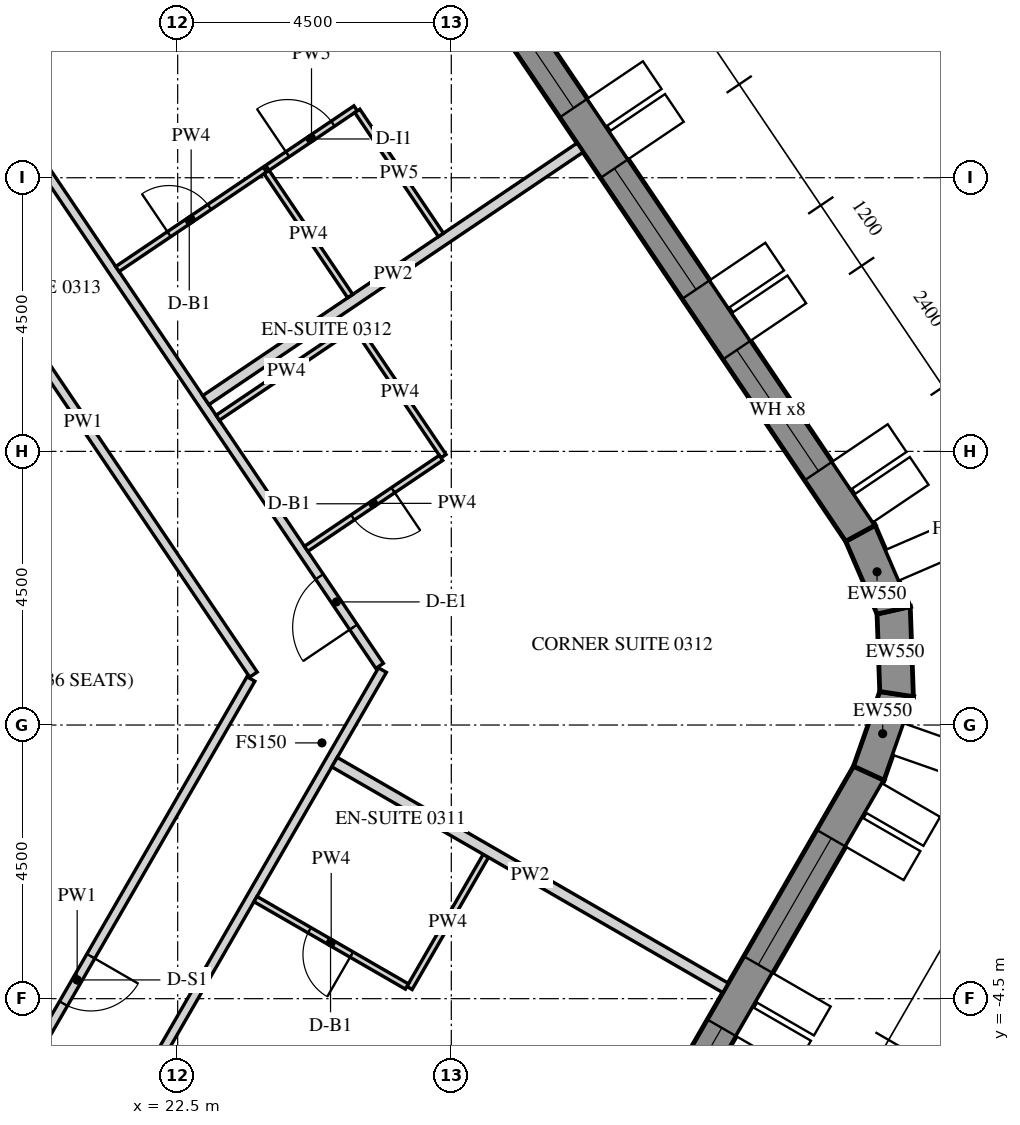
"""IFC4 building model, lengths in metres.
Left out: names, types, materials, properties, quantities, classifications, styles, units other than length and angle.
Written with IfcOpenShell. Run it as: python <this file> out.ifc"""

import sys

from ifc_helpers import new_model, si_unit, direction, frame, frame_2d, origin, place, context, subcontext, project, spatial, polyline, rectangle, outline, extrude, element, fill, save


model = new_model("IFC4")
c1 = context("Model", 3, precision=1e-05, world=origin(), true_north=direction((0.0, 1.0)))
c2 = subcontext(c1, "Body", "Model", "MODEL_VIEW")
j1 = project(units=[si_unit("LENGTHUNIT", "METRE"), si_unit("PLANEANGLEUNIT", "RADIAN")], contexts=[c1])
p1 = place(None, origin())
s1 = spatial("IfcSite", under=j1, at=p1, CompositionType="ELEMENT")
p2 = place(p1, origin())
s2 = spatial("IfcBuilding", under=s1, at=p2, CompositionType="ELEMENT")
p3 = place(p2, frame((0.0, 0.0, 60.9)))
s3 = spatial("IfcBuildingStorey", under=s2, at=p3, CompositionType="ELEMENT", Elevation=60.9)
p4 = place(p3, frame((18.83, -26.835, -0.15), z_axis=(0.0, 0.0, 1.0), x_axis=(0.500003800416, 0.866023209602, 0.0)))
e1 = element("IfcWall", 1, at=p4, inside=s3, PredefinedType="SOLIDWALL", context=c2, shape_type="SweptSolid", body=[
    extrude(outline(polyline([(-0.022, -0.275), (30.097, -0.275), (30.045, 0.275), (0.022, 0.275), (-0.022, -0.275)])), origin(), (0.0, 0.0, 1.0), 3.9),
])
p5 = place(p4, frame((1.236, 0.0, 1.05)))
e2 = element("IfcOpeningElement", 2, at=p5, cuts=e1, PredefinedType="OPENING", context=c2, shape_type="SweptSolid", body=[
    extrude(rectangle(XDim=2.4, YDim=2.4, at=frame_2d((1.2, 1.2))), frame((0.0, 0.285, 0.0), z_axis=(0.0, -1.0, 0.0), x_axis=(1.0, 0.0, 0.0)), (0.0, 0.0, 1.0), 0.57),
])
p6 = place(p4, frame((4.835, 0.0, 1.05)))
e3 = element("IfcOpeningElement", 3, at=p6, cuts=e1, PredefinedType="OPENING", context=c2, shape_type="SweptSolid", body=[
    extrude(rectangle(XDim=2.4, YDim=2.4, at=frame_2d((1.2, 1.2))), frame((0.0, 0.285, 0.0), z_axis=(0.0, -1.0, 0.0), x_axis=(1.0, 0.0, 0.0)), (0.0, 0.0, 1.0), 0.57),
])
p7 = place(p4, frame((8.436, 0.0, 1.05)))
e4 = element("IfcOpeningElement", 4, at=p7, cuts=e1, PredefinedType="OPENING", context=c2, shape_type="SweptSolid", body=[
    extrude(rectangle(XDim=2.4, YDim=2.4, at=frame_2d((1.2, 1.2))), frame((0.0, 0.285, 0.0), z_axis=(0.0, -1.0, 0.0), x_axis=(1.0, 0.0, 0.0)), (0.0, 0.0, 1.0), 0.57),
])
p8 = place(p4, frame((12.035, 0.0, 1.05)))
e5 = element("IfcOpeningElement", 5, at=p8, cuts=e1, PredefinedType="OPENING", context=c2, shape_type="SweptSolid", body=[
    extrude(rectangle(XDim=2.4, YDim=2.4, at=frame_2d((1.2, 1.2))), frame((0.0, 0.285, 0.0), z_axis=(0.0, -1.0, 0.0), x_axis=(1.0, 0.0, 0.0)), (0.0, 0.0, 1.0), 0.57),
])
p9 = place(p4, frame((15.635, 0.0, 1.05)))
e6 = element("IfcOpeningElement", 6, at=p9, cuts=e1, PredefinedType="OPENING", context=c2, shape_type="SweptSolid", body=[
    extrude(rectangle(XDim=2.4, YDim=2.4, at=frame_2d((1.2, 1.2))), frame((0.0, 0.285, 0.0), z_axis=(0.0, -1.0, 0.0), x_axis=(1.0, 0.0, 0.0)), (0.0, 0.0, 1.0), 0.57),
])
p10 = place(p4, frame((19.236, 0.0, 1.05)))
e7 = element("IfcOpeningElement", 7, at=p10, cuts=e1, PredefinedType="OPENING", context=c2, shape_type="SweptSolid", body=[
    extrude(rectangle(XDim=2.4, YDim=2.4, at=frame_2d((1.2, 1.2))), frame((0.0, 0.285, 0.0), z_axis=(0.0, -1.0, 0.0), x_axis=(1.0, 0.0, 0.0)), (0.0, 0.0, 1.0), 0.57),
])
p11 = place(p4, frame((22.835, 0.0, 1.05)))
e8 = element("IfcOpeningElement", 8, at=p11, cuts=e1, PredefinedType="OPENING", context=c2, shape_type="SweptSolid", body=[
    extrude(rectangle(XDim=2.4, YDim=2.4, at=frame_2d((1.2, 1.2))), frame((0.0, 0.285, 0.0), z_axis=(0.0, -1.0, 0.0), x_axis=(1.0, 0.0, 0.0)), (0.0, 0.0, 1.0), 0.57),
])
p12 = place(p4, frame((26.436, 0.0, 1.05)))
e9 = element("IfcOpeningElement", 9, at=p12, cuts=e1, PredefinedType="OPENING", context=c2, shape_type="SweptSolid", body=[
    extrude(rectangle(XDim=2.4, YDim=2.4, at=frame_2d((1.2, 1.2))), frame((0.0, 0.285, 0.0), z_axis=(0.0, -1.0, 0.0), x_axis=(1.0, 0.0, 0.0)), (0.0, 0.0, 1.0), 0.57),
])
p13 = place(p3, frame((33.866, -0.792, -0.15), z_axis=(0.0, 0.0, 1.0), x_axis=(0.33111537203, 0.943590276765, 0.0)))
e10 = element("IfcWall", 10, at=p13, inside=s3, PredefinedType="SOLIDWALL", context=c2, shape_type="SweptSolid", body=[
    extrude(outline(polyline([(-0.026, -0.275), (1.431, -0.275), (1.327, 0.275), (0.026, 0.275), (-0.026, -0.275)])), origin(), (0.0, 0.0, 1.0), 3.9),
])
p14 = place(p3, frame((34.323, 0.509, -0.15), z_axis=(0.0, 0.0, 1.0), x_axis=(-0.034876908462, 0.999391615562, 0.0)))
e11 = element("IfcWall", 11, at=p14, inside=s3, PredefinedType="SOLIDWALL", context=c2, shape_type="SweptSolid", body=[
    extrude(outline(polyline([(-0.052, -0.275), (1.431, -0.275), (1.327, 0.275), (0.052, 0.275), (-0.052, -0.275)])), origin(), (0.0, 0.0, 1.0), 3.9),
])
p15 = place(p3, frame((34.274, 1.887, -0.15), z_axis=(0.0, 0.0, 1.0), x_axis=(-0.396161342798, 0.918180913803, 0.0)))
e12 = element("IfcWall", 12, at=p15, inside=s3, PredefinedType="SOLIDWALL", context=c2, shape_type="SweptSolid", body=[
    extrude(outline(polyline([(-0.052, -0.275), (1.405, -0.275), (1.354, 0.275), (0.052, 0.275), (-0.052, -0.275)])), origin(), (0.0, 0.0, 1.0), 3.9),
])
p16 = place(p3, frame((33.728, 3.153, -0.15), z_axis=(0.0, 0.0, 1.0), x_axis=(-0.559192411416, 0.82903790445, 0.0)))
e13 = element("IfcWall", 13, at=p16, inside=s3, PredefinedType="SOLIDWALL", context=c2, shape_type="SweptSolid", body=[
    extrude(outline(polyline([(-0.026, -0.275), (30.093, -0.275), (30.048, 0.275), (0.026, 0.275), (-0.026, -0.275)])), origin(), (0.0, 0.0, 1.0), 3.9),
])
p17 = place(p16, frame((1.236, 0.0, 1.05)))
e14 = element("IfcOpeningElement", 14, at=p17, cuts=e13, PredefinedType="OPENING", context=c2, shape_type="SweptSolid", body=[
    extrude(rectangle(XDim=2.4, YDim=2.4, at=frame_2d((1.2, 1.2))), frame((0.0, 0.285, 0.0), z_axis=(0.0, -1.0, 0.0), x_axis=(1.0, 0.0, 0.0)), (0.0, 0.0, 1.0), 0.57),
])
p18 = place(p16, frame((4.835, 0.0, 1.05)))
e15 = element("IfcOpeningElement", 15, at=p18, cuts=e13, PredefinedType="OPENING", context=c2, shape_type="SweptSolid", body=[
    extrude(rectangle(XDim=2.4, YDim=2.4, at=frame_2d((1.2, 1.2))), frame((0.0, 0.285, 0.0), z_axis=(0.0, -1.0, 0.0), x_axis=(1.0, 0.0, 0.0)), (0.0, 0.0, 1.0), 0.57),
])
p19 = place(p16, frame((8.436, 0.0, 1.05)))
e16 = element("IfcOpeningElement", 16, at=p19, cuts=e13, PredefinedType="OPENING", context=c2, shape_type="SweptSolid", body=[
    extrude(rectangle(XDim=2.4, YDim=2.4, at=frame_2d((1.2, 1.2))), frame((0.0, 0.285, 0.0), z_axis=(0.0, -1.0, 0.0), x_axis=(1.0, 0.0, 0.0)), (0.0, 0.0, 1.0), 0.57),
])
p20 = place(p16, frame((12.035, 0.0, 1.05)))
e17 = element("IfcOpeningElement", 17, at=p20, cuts=e13, PredefinedType="OPENING", context=c2, shape_type="SweptSolid", body=[
    extrude(rectangle(XDim=2.4, YDim=2.4, at=frame_2d((1.2, 1.2))), frame((0.0, 0.285, 0.0), z_axis=(0.0, -1.0, 0.0), x_axis=(1.0, 0.0, 0.0)), (0.0, 0.0, 1.0), 0.57),
])
p21 = place(p16, frame((15.635, 0.0, 1.05)))
e18 = element("IfcOpeningElement", 18, at=p21, cuts=e13, PredefinedType="OPENING", context=c2, shape_type="SweptSolid", body=[
    extrude(rectangle(XDim=2.4, YDim=2.4, at=frame_2d((1.2, 1.2))), frame((0.0, 0.285, 0.0), z_axis=(0.0, -1.0, 0.0), x_axis=(1.0, 0.0, 0.0)), (0.0, 0.0, 1.0), 0.57),
])
p22 = place(p16, frame((19.236, 0.0, 1.05)))
e19 = element("IfcOpeningElement", 19, at=p22, cuts=e13, PredefinedType="OPENING", context=c2, shape_type="SweptSolid", body=[
    extrude(rectangle(XDim=2.4, YDim=2.4, at=frame_2d((1.2, 1.2))), frame((0.0, 0.285, 0.0), z_axis=(0.0, -1.0, 0.0), x_axis=(1.0, 0.0, 0.0)), (0.0, 0.0, 1.0), 0.57),
])
p23 = place(p16, frame((22.835, 0.0, 1.05)))
e20 = element("IfcOpeningElement", 20, at=p23, cuts=e13, PredefinedType="OPENING", context=c2, shape_type="SweptSolid", body=[
    extrude(rectangle(XDim=2.4, YDim=2.4, at=frame_2d((1.2, 1.2))), frame((0.0, 0.285, 0.0), z_axis=(0.0, -1.0, 0.0), x_axis=(1.0, 0.0, 0.0)), (0.0, 0.0, 1.0), 0.57),
])
p24 = place(p16, frame((26.436, 0.0, 1.05)))
e21 = element("IfcOpeningElement", 21, at=p24, cuts=e13, PredefinedType="OPENING", context=c2, shape_type="SweptSolid", body=[
    extrude(rectangle(XDim=2.4, YDim=2.4, at=frame_2d((1.2, 1.2))), frame((0.0, 0.285, 0.0), z_axis=(0.0, -1.0, 0.0), x_axis=(1.0, 0.0, 0.0)), (0.0, 0.0, 1.0), 0.57),
])
p25 = place(p3, frame((13.928, -19.775, 0.0), z_axis=(0.0, 0.0, 1.0), x_axis=(0.50000450071, 0.866022805283, 0.0)))
e22 = element("IfcWall", 22, at=p25, inside=s3, PredefinedType="PARTITIONING", context=c2, shape_type="SweptSolid", body=[
    extrude(rectangle(XDim=23.877, YDim=0.15, at=frame_2d((11.938, 0.0))), origin(), (0.0, 0.0, 1.0), 2.988),
])
p26 = place(p25, frame((6.443, 0.0, 0.0)))
e23 = element("IfcOpeningElement", 23, at=p26, cuts=e22, PredefinedType="OPENING", context=c2, shape_type="SweptSolid", body=[
    extrude(rectangle(XDim=1.0, YDim=2.1, at=frame_2d((0.5, 1.05))), frame((0.0, 0.085, 0.0), z_axis=(0.0, -1.0, 0.0), x_axis=(1.0, 0.0, 0.0)), (0.0, 0.0, 1.0), 0.17),
])
p27 = place(p25, frame((14.972, 0.0, 0.0)))
e24 = element("IfcOpeningElement", 24, at=p27, cuts=e22, PredefinedType="OPENING", context=c2, shape_type="SweptSolid", body=[
    extrude(rectangle(XDim=1.0, YDim=2.1, at=frame_2d((0.5, 1.05))), frame((0.0, 0.085, 0.0), z_axis=(0.0, -1.0, 0.0), x_axis=(1.0, 0.0, 0.0)), (0.0, 0.0, 1.0), 0.17),
])
p28 = place(p3, frame((25.821, 0.972, 0.0), z_axis=(0.0, 0.0, 1.0), x_axis=(-0.559201442833, 0.829031812619, 0.0)))
e25 = element("IfcWall", 25, at=p28, inside=s3, PredefinedType="PARTITIONING", context=c2, shape_type="SweptSolid", body=[
    extrude(rectangle(XDim=22.002, YDim=0.15, at=frame_2d((11.001, 0.0))), origin(), (0.0, 0.0, 1.0), 2.988),
])
p29 = place(p28, frame((0.769, 0.0, 0.0)))
e26 = element("IfcOpeningElement", 26, at=p29, cuts=e25, PredefinedType="OPENING", context=c2, shape_type="SweptSolid", body=[
    extrude(rectangle(XDim=1.0, YDim=2.1, at=frame_2d((0.5, 1.05))), frame((0.0, 0.085, 0.0), z_axis=(0.0, -1.0, 0.0), x_axis=(1.0, 0.0, 0.0)), (0.0, 0.0, 1.0), 0.17),
])
p30 = place(p28, frame((11.421, 0.0, 0.0)))
e27 = element("IfcOpeningElement", 27, at=p30, cuts=e25, PredefinedType="OPENING", context=c2, shape_type="SweptSolid", body=[
    extrude(rectangle(XDim=1.0, YDim=2.1, at=frame_2d((0.5, 1.05))), frame((0.0, 0.085, 0.0), z_axis=(0.0, -1.0, 0.0), x_axis=(1.0, 0.0, 0.0)), (0.0, 0.0, 1.0), 0.17),
])
p31 = place(p28, frame((19.711, 0.0, 0.0)))
e28 = element("IfcOpeningElement", 28, at=p31, cuts=e25, PredefinedType="OPENING", context=c2, shape_type="SweptSolid", body=[
    extrude(rectangle(XDim=1.0, YDim=2.1, at=frame_2d((0.5, 1.05))), frame((0.0, 0.085, 0.0), z_axis=(0.0, -1.0, 0.0), x_axis=(1.0, 0.0, 0.0)), (0.0, 0.0, 1.0), 0.17),
])
p32 = place(p3, frame((18.14, 9.141, 0.0), z_axis=(0.0, 0.0, 1.0), x_axis=(0.55918799196, -0.829040885389, 0.0)))
e29 = element("IfcWall", 29, at=p32, inside=s3, PredefinedType="PARTITIONING", context=c2, shape_type="SweptSolid", body=[
    extrude(rectangle(XDim=10.025, YDim=0.15, at=frame_2d((5.013, 0.0))), origin(), (0.0, 0.0, 1.0), 2.988),
])
p33 = place(p3, frame((23.704, 0.757, 0.0), z_axis=(0.0, 0.0, 1.0), x_axis=(-0.500010297365, -0.866019458516, 0.0)))
e30 = element("IfcWall", 30, at=p33, inside=s3, PredefinedType="PARTITIONING", context=c2, shape_type="SweptSolid", body=[
    extrude(rectangle(XDim=11.429, YDim=0.15, at=frame_2d((5.714, 0.0))), origin(), (0.0, 0.0, 1.0), 2.988),
])
p34 = place(p33, frame((5.264, 0.0, 0.0)))
e31 = element("IfcOpeningElement", 31, at=p34, cuts=e30, PredefinedType="OPENING", context=c2, shape_type="SweptSolid", body=[
    extrude(rectangle(XDim=0.9, YDim=2.1, at=frame_2d((0.45, 1.05))), frame((0.0, 0.085, 0.0), z_axis=(0.0, -1.0, 0.0), x_axis=(1.0, 0.0, 0.0)), (0.0, 0.0, 1.0), 0.17),
])
p35 = place(p3, frame((27.568, -2.151, 0.0), z_axis=(0.0, 0.0, 1.0), x_axis=(-0.499989096993, -0.866031698547, 0.0)))
e32 = element("IfcWall", 32, at=p35, inside=s3, PredefinedType="PARTITIONING", context=c2, shape_type="SweptSolid", body=[
    extrude(rectangle(XDim=2.51, YDim=0.1, at=frame_2d((1.255, 0.0))), origin(), (0.0, 0.0, 1.0), 2.988),
])
p36 = place(p3, frame((26.27, -4.3, 0.0), z_axis=(0.0, 0.0, 1.0), x_axis=(-0.866018712932, 0.500011588718, 0.0)))
e33 = element("IfcWall", 33, at=p36, inside=s3, PredefinedType="PARTITIONING", context=c2, shape_type="SweptSolid", body=[
    extrude(rectangle(XDim=2.875, YDim=0.1, at=frame_2d((1.438, 0.0))), origin(), (0.0, 0.0, 1.0), 2.988),
])
p37 = place(p36, frame((1.05, 0.0, 0.0)))
e34 = element("IfcOpeningElement", 34, at=p37, cuts=e33, PredefinedType="OPENING", context=c2, shape_type="SweptSolid", body=[
    extrude(rectangle(XDim=0.8, YDim=2.1, at=frame_2d((0.4, 1.05))), frame((0.0, 0.06, 0.0), z_axis=(0.0, -1.0, 0.0), x_axis=(1.0, 0.0, 0.0)), (0.0, 0.0, 1.0), 0.12),
])
p38 = place(p3, frame((31.51, -4.323, 0.0), z_axis=(0.0, 0.0, 1.0), x_axis=(-0.866028983062, 0.499993800457, 0.0)))
e35 = element("IfcWall", 35, at=p38, inside=s3, PredefinedType="PARTITIONING", context=c2, shape_type="SweptSolid", body=[
    extrude(rectangle(XDim=7.425, YDim=0.18, at=frame_2d((3.712, 0.0))), origin(), (0.0, 0.0, 1.0), 2.988),
])
p39 = place(p3, frame((23.159, 5.053, 0.0), z_axis=(0.0, 0.0, 1.0), x_axis=(0.829047014003, 0.559178905694, 0.0)))
e36 = element("IfcWall", 36, at=p39, inside=s3, PredefinedType="PARTITIONING", context=c2, shape_type="SweptSolid", body=[
    extrude(rectangle(XDim=2.725, YDim=0.1, at=frame_2d((1.362, 0.0))), origin(), (0.0, 0.0, 1.0), 2.988),
])
p40 = place(p3, frame((25.446, 6.535, 0.0), z_axis=(0.0, 0.0, 1.0), x_axis=(0.559176864802, -0.829048390548, 0.0)))
e37 = element("IfcWall", 37, at=p40, inside=s3, PredefinedType="PARTITIONING", context=c2, shape_type="SweptSolid", body=[
    extrude(rectangle(XDim=2.55, YDim=0.1, at=frame_2d((1.275, 0.0))), origin(), (0.0, 0.0, 1.0), 2.988),
])
p41 = place(p3, frame((26.83, 4.393, 0.0), z_axis=(0.0, 0.0, 1.0), x_axis=(-0.82904753069, -0.559178139645, 0.0)))
e38 = element("IfcWall", 38, at=p41, inside=s3, PredefinedType="PARTITIONING", context=c2, shape_type="SweptSolid", body=[
    extrude(rectangle(XDim=2.675, YDim=0.1, at=frame_2d((1.337, 0.0))), origin(), (0.0, 0.0, 1.0), 2.988),
])
p42 = place(p41, frame((0.95, 0.0, 0.0)))
e39 = element("IfcOpeningElement", 39, at=p42, cuts=e38, PredefinedType="OPENING", context=c2, shape_type="SweptSolid", body=[
    extrude(rectangle(XDim=0.8, YDim=2.1, at=frame_2d((0.4, 1.05))), frame((0.0, 0.06, 0.0), z_axis=(0.0, -1.0, 0.0), x_axis=(1.0, 0.0, 0.0)), (0.0, 0.0, 1.0), 0.12),
])
p43 = place(p3, frame((29.119, 9.495, 0.0), z_axis=(0.0, 0.0, 1.0), x_axis=(-0.829038452737, -0.559191598545, 0.0)))
e40 = element("IfcWall", 40, at=p43, inside=s3, PredefinedType="PARTITIONING", context=c2, shape_type="SweptSolid", body=[
    extrude(rectangle(XDim=7.425, YDim=0.18, at=frame_2d((3.713, 0.0))), origin(), (0.0, 0.0, 1.0), 2.988),
])
p44 = place(p3, frame((21.509, 7.499, 0.0), z_axis=(0.0, 0.0, 1.0), x_axis=(0.829033436212, 0.559199035802, 0.0)))
e41 = element("IfcWall", 41, at=p44, inside=s3, PredefinedType="PARTITIONING", context=c2, shape_type="SweptSolid", body=[
    extrude(rectangle(XDim=2.925, YDim=0.1, at=frame_2d((1.462, 0.0))), origin(), (0.0, 0.0, 1.0), 2.988),
])
p45 = place(p44, frame((1.025, 0.0, 0.0)))
e42 = element("IfcOpeningElement", 42, at=p45, cuts=e41, PredefinedType="OPENING", context=c2, shape_type="SweptSolid", body=[
    extrude(rectangle(XDim=0.8, YDim=2.1, at=frame_2d((0.4, 1.05))), frame((0.0, 0.06, 0.0), z_axis=(0.0, -1.0, 0.0), x_axis=(1.0, 0.0, 0.0)), (0.0, 0.0, 1.0), 0.12),
])
p46 = place(p3, frame((23.975, 9.162, 0.0), z_axis=(0.0, 0.0, 1.0), x_axis=(0.829011970545, 0.559230858138, 0.0)))
e43 = element("IfcWall", 43, at=p46, inside=s3, PredefinedType="PARTITIONING", context=c2, shape_type="SweptSolid", body=[
    extrude(rectangle(XDim=1.75, YDim=0.1, at=frame_2d((0.875, 0.0))), origin(), (0.0, 0.0, 1.0), 2.988),
])
p47 = place(p46, frame((0.4, 0.0, 0.0)))
e44 = element("IfcOpeningElement", 44, at=p47, cuts=e43, PredefinedType="OPENING", context=c2, shape_type="SweptSolid", body=[
    extrude(rectangle(XDim=0.9, YDim=2.1, at=frame_2d((0.45, 1.05))), frame((0.0, 0.06, 0.0), z_axis=(0.0, -1.0, 0.0), x_axis=(1.0, 0.0, 0.0)), (0.0, 0.0, 1.0), 0.12),
])
for number, where, z_axis, x_axis in (
    (45, (25.454, 10.099, 0.0), (0.0, 0.0, 1.0), (0.559, -0.829, 0.0)),
    (46, (25.338, 7.053, 0.0), (0.0, 0.0, 1.0), (-0.559, 0.829, 0.0)),
):
    element("IfcWall", number, at=place(p3, frame(where, z_axis=z_axis, x_axis=x_axis)), inside=s3, PredefinedType="PARTITIONING", context=c2, shape_type="SweptSolid", body=[
        extrude(rectangle(XDim=2.46, YDim=0.1, at=frame_2d((1.23, 0.0))), origin(), (0.0, 0.0, 1.0), 2.988),
    ])
p48 = place(p11, frame((0.0, 0.205, 0.0)))
e47 = element("IfcWindow", 47, at=p48, inside=s3, PartitioningType="DOUBLE_PANEL_VERTICAL", PredefinedType="WINDOW", context=c2, shape_type="SweptSolid", body=[
    extrude(rectangle(XDim=2.4, YDim=2.4, at=frame_2d((1.2, 1.2))), frame((0.0, 0.03, 0.0), z_axis=(0.0, -1.0, 0.0), x_axis=(1.0, 0.0, 0.0)), (0.0, 0.0, 1.0), 0.06),
])
fill(e8, e47)
p49 = place(p12, frame((0.0, 0.205, 0.0)))
e48 = element("IfcWindow", 48, at=p49, inside=s3, PartitioningType="DOUBLE_PANEL_VERTICAL", PredefinedType="WINDOW", context=c2, shape_type="SweptSolid", body=[
    extrude(rectangle(XDim=2.4, YDim=2.4, at=frame_2d((1.2, 1.2))), frame((0.0, 0.03, 0.0), z_axis=(0.0, -1.0, 0.0), x_axis=(1.0, 0.0, 0.0)), (0.0, 0.0, 1.0), 0.06),
])
fill(e9, e48)
p50 = place(p17, frame((0.0, 0.205, 0.0)))
e49 = element("IfcWindow", 49, at=p50, inside=s3, PartitioningType="DOUBLE_PANEL_VERTICAL", PredefinedType="WINDOW", context=c2, shape_type="SweptSolid", body=[
    extrude(rectangle(XDim=2.4, YDim=2.4, at=frame_2d((1.2, 1.2))), frame((0.0, 0.03, 0.0), z_axis=(0.0, -1.0, 0.0), x_axis=(1.0, 0.0, 0.0)), (0.0, 0.0, 1.0), 0.06),
])
fill(e14, e49)
p51 = place(p18, frame((0.0, 0.205, 0.0)))
e50 = element("IfcWindow", 50, at=p51, inside=s3, PartitioningType="DOUBLE_PANEL_VERTICAL", PredefinedType="WINDOW", context=c2, shape_type="SweptSolid", body=[
    extrude(rectangle(XDim=2.4, YDim=2.4, at=frame_2d((1.2, 1.2))), frame((0.0, 0.03, 0.0), z_axis=(0.0, -1.0, 0.0), x_axis=(1.0, 0.0, 0.0)), (0.0, 0.0, 1.0), 0.06),
])
fill(e15, e50)
p52 = place(p19, frame((0.0, 0.205, 0.0)))
e51 = element("IfcWindow", 51, at=p52, inside=s3, PartitioningType="DOUBLE_PANEL_VERTICAL", PredefinedType="WINDOW", context=c2, shape_type="SweptSolid", body=[
    extrude(rectangle(XDim=2.4, YDim=2.4, at=frame_2d((1.2, 1.2))), frame((0.0, 0.03, 0.0), z_axis=(0.0, -1.0, 0.0), x_axis=(1.0, 0.0, 0.0)), (0.0, 0.0, 1.0), 0.06),
])
fill(e16, e51)
p53 = place(p37, origin())
e52 = element("IfcDoor", 52, at=p53, inside=s3, OperationType="SINGLE_SWING_LEFT", PredefinedType="DOOR", context=c2, shape_type="SweptSolid", body=[
    extrude(rectangle(XDim=0.8, YDim=2.1, at=frame_2d((0.4, 1.05))), frame((0.0, 0.025, 0.0), z_axis=(0.0, -1.0, 0.0), x_axis=(1.0, 0.0, 0.0)), (0.0, 0.0, 1.0), 0.05),
])
fill(e34, e52)
p54 = place(p29, origin())
e53 = element("IfcDoor", 53, at=p54, inside=s3, OperationType="SINGLE_SWING_RIGHT", PredefinedType="DOOR", context=c2, shape_type="SweptSolid", body=[
    extrude(rectangle(XDim=1.0, YDim=2.1, at=frame_2d((0.5, 1.05))), frame((0.0, 0.025, 0.0), z_axis=(0.0, -1.0, 0.0), x_axis=(1.0, 0.0, 0.0)), (0.0, 0.0, 1.0), 0.05),
])
fill(e26, e53)
p55 = place(p42, origin())
e54 = element("IfcDoor", 54, at=p55, inside=s3, OperationType="SINGLE_SWING_LEFT", PredefinedType="DOOR", context=c2, shape_type="SweptSolid", body=[
    extrude(rectangle(XDim=0.8, YDim=2.1, at=frame_2d((0.4, 1.05))), frame((0.0, 0.025, 0.0), z_axis=(0.0, -1.0, 0.0), x_axis=(1.0, 0.0, 0.0)), (0.0, 0.0, 1.0), 0.05),
])
fill(e39, e54)
p56 = place(p45, origin())
e55 = element("IfcDoor", 55, at=p56, inside=s3, OperationType="SINGLE_SWING_RIGHT", PredefinedType="DOOR", context=c2, shape_type="SweptSolid", body=[
    extrude(rectangle(XDim=0.8, YDim=2.1, at=frame_2d((0.4, 1.05))), frame((0.0, 0.025, 0.0), z_axis=(0.0, -1.0, 0.0), x_axis=(1.0, 0.0, 0.0)), (0.0, 0.0, 1.0), 0.05),
])
fill(e42, e55)
p57 = place(p47, origin())
e56 = element("IfcDoor", 56, at=p57, inside=s3, OperationType="SINGLE_SWING_RIGHT", PredefinedType="DOOR", context=c2, shape_type="SweptSolid", body=[
    extrude(rectangle(XDim=0.9, YDim=2.1, at=frame_2d((0.45, 1.05))), frame((0.0, 0.025, 0.0), z_axis=(0.0, -1.0, 0.0), x_axis=(1.0, 0.0, 0.0)), (0.0, 0.0, 1.0), 0.05),
])
fill(e44, e56)
p58 = place(p34, origin())
e57 = element("IfcDoor", 57, at=p58, inside=s3, OperationType="SINGLE_SWING_LEFT", PredefinedType="DOOR", context=c2, shape_type="SweptSolid", body=[
    extrude(rectangle(XDim=0.9, YDim=2.1, at=frame_2d((0.45, 1.05))), frame((0.0, 0.025, 0.0), z_axis=(0.0, -1.0, 0.0), x_axis=(1.0, 0.0, 0.0)), (0.0, 0.0, 1.0), 0.05),
])
fill(e31, e57)
save(model, sys.argv[1])
